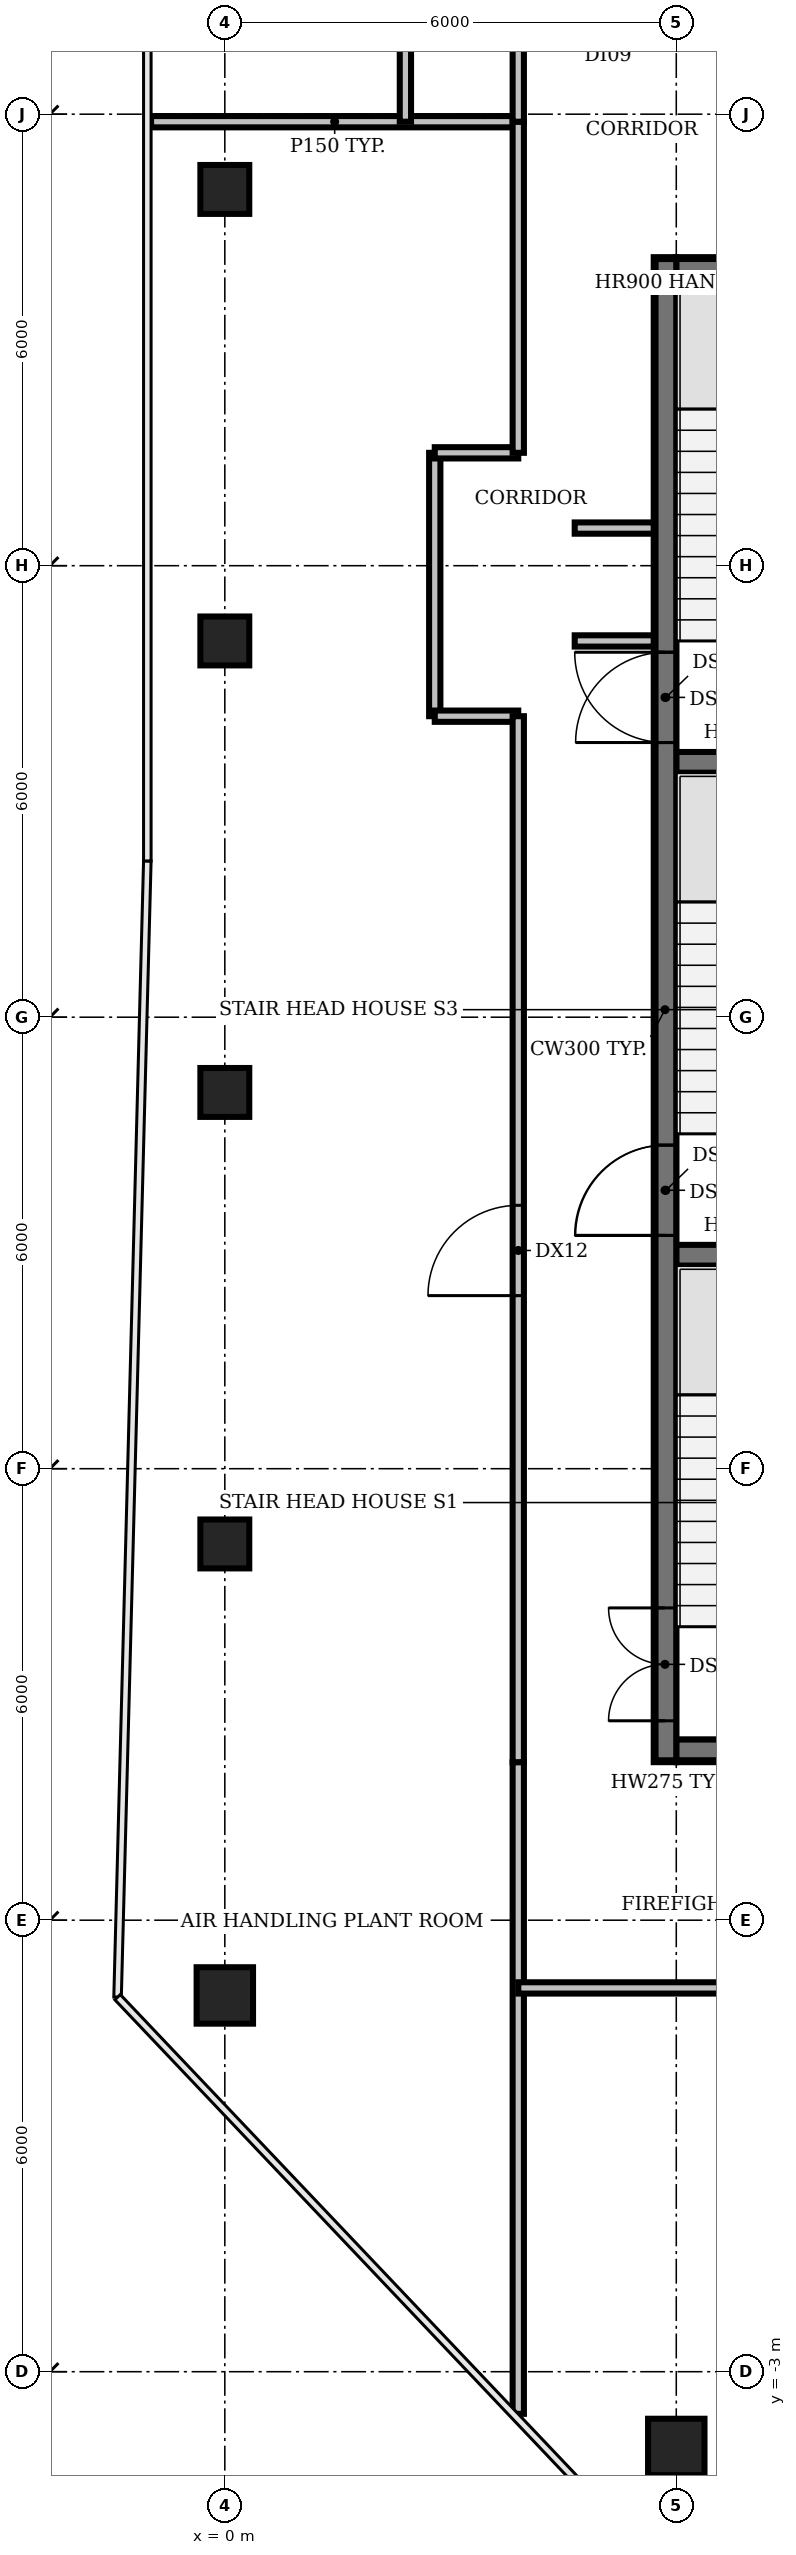
"""IFC4 building model, lengths in metres.
Left out: names, types, materials, properties, quantities, classifications, styles, units other than length and angle.
Written with IfcOpenShell. Run it as: python <this file> out.ifc"""

import sys

from ifc_helpers import new_model, si_unit, direction, frame, frame_2d, origin, origin_2d, place, context, subcontext, project, spatial, rectangle, circle, extrude, element, fill, save


model = new_model("IFC4")
c1 = context("Model", 3, precision=1e-05, world=origin(), true_north=direction((0.0, 1.0)))
c2 = subcontext(c1, "Body", "Model", "MODEL_VIEW")
j1 = project(units=[si_unit("LENGTHUNIT", "METRE"), si_unit("PLANEANGLEUNIT", "RADIAN")], contexts=[c1])
p1 = place(None, origin())
s1 = spatial("IfcSite", under=j1, at=p1, CompositionType="ELEMENT")
p2 = place(p1, origin())
s2 = spatial("IfcBuilding", under=s1, at=p2, CompositionType="ELEMENT")
p3 = place(p2, frame((0.0, 0.0, 339.8)))
s3 = spatial("IfcBuildingStorey", under=s2, at=p3, CompositionType="ELEMENT", Elevation=339.8)
p4 = place(p3, frame((0.0, 2.0, 0.0), z_axis=(0.0, 0.0, 1.0), x_axis=(1.0, 0.0, 0.0)))
e1 = element("IfcColumn", 1, at=p4, inside=s3, PredefinedType="COLUMN", context=c2, shape_type="SweptSolid", body=[
    extrude(circle(Radius=0.375, at=origin_2d()), origin(), (0.0, 0.0, 1.0), 3.9),
])
for number, where, z_axis, x_axis in (
    (2, (0.0, 8.0, 0.0), (0.0, 0.0, 1.0), (1.0, 0.0, 0.0)),
    (3, (0.0, 14.0, 0.0), (0.0, 0.0, 1.0), (1.0, 0.0, 0.0)),
    (4, (0.0, 20.0, 0.0), (0.0, 0.0, 1.0), (1.0, 0.0, 0.0)),
    (5, (0.0, 26.0, 0.0), (0.0, 0.0, 1.0), (1.0, 0.0, 0.0)),
):
    element("IfcColumn", number, at=place(p3, frame(where, z_axis=z_axis, x_axis=x_axis)), inside=s3, PredefinedType="COLUMN", context=c2, shape_type="SweptSolid", body=[
        extrude(rectangle(XDim=0.65, YDim=0.65, at=origin_2d()), origin(), (0.0, 0.0, 1.0), 3.9),
    ])
p5 = place(p3, frame((6.0, -4.0, 0.0), z_axis=(0.0, 0.0, 1.0), x_axis=(1.0, 0.0, 0.0)))
e6 = element("IfcColumn", 6, at=p5, inside=s3, PredefinedType="COLUMN", context=c2, shape_type="SweptSolid", body=[
    extrude(circle(Radius=0.375, at=origin_2d()), origin(), (0.0, 0.0, 1.0), 3.9),
])
for number, where, z_axis, x_axis in (
    (7, (6.0, 11.825, 0.0), (0.0, 0.0, 1.0), (1.0, 0.0, 0.0)),
    (8, (6.0, 18.375, 0.0), (0.0, 0.0, 1.0), (1.0, 0.0, 0.0)),
):
    element("IfcWall", number, at=place(p3, frame(where, z_axis=z_axis, x_axis=x_axis)), inside=s3, PredefinedType="SHEAR", context=c2, shape_type="SweptSolid", body=[
        extrude(rectangle(XDim=3.15, YDim=0.25, at=frame_2d((1.575, 0.0))), origin(), (0.0, 0.0, 1.0), 3.9),
    ])
p6 = place(p3, frame((5.85, 5.1, 0.0), z_axis=(0.0, 0.0, 1.0), x_axis=(0.0, 1.0, 0.0)))
e9 = element("IfcWall", 9, at=p6, inside=s3, PredefinedType="SHEAR", context=c2, shape_type="SweptSolid", body=[
    extrude(rectangle(XDim=20.0, YDim=0.3, at=frame_2d((10.0, 0.0))), origin(), (0.0, 0.0, 1.0), 3.9),
])
p7 = place(p6, frame((0.55, 0.0, 0.0)))
e10 = element("IfcOpeningElement", 10, at=p7, cuts=e9, PredefinedType="OPENING", context=c2, shape_type="SweptSolid", body=[
    extrude(rectangle(XDim=1.5, YDim=2.1, at=frame_2d((0.75, 1.05))), frame((0.0, 0.16, 0.0), z_axis=(0.0, -1.0, 0.0), x_axis=(1.0, 0.0, 0.0)), (0.0, 0.0, 1.0), 0.32),
])
p8 = place(p6, frame((7.0, 0.0, 0.0)))
e11 = element("IfcOpeningElement", 11, at=p8, cuts=e9, PredefinedType="OPENING", context=c2, shape_type="SweptSolid", body=[
    extrude(rectangle(XDim=1.2, YDim=2.1, at=frame_2d((0.6, 1.05))), frame((0.0, 0.16, 0.0), z_axis=(0.0, -1.0, 0.0), x_axis=(1.0, 0.0, 0.0)), (0.0, 0.0, 1.0), 0.32),
])
p9 = place(p6, frame((13.55, 0.0, 0.0)))
e12 = element("IfcOpeningElement", 12, at=p9, cuts=e9, PredefinedType="OPENING", context=c2, shape_type="SweptSolid", body=[
    extrude(rectangle(XDim=1.2, YDim=2.1, at=frame_2d((0.6, 1.05))), frame((0.0, 0.16, 0.0), z_axis=(0.0, -1.0, 0.0), x_axis=(1.0, 0.0, 0.0)), (0.0, 0.0, 1.0), 0.32),
])
p10 = place(p3, frame((24.0, 5.25, 0.0), z_axis=(0.0, 0.0, 1.0), x_axis=(-1.0, 0.0, 0.0)))
e13 = element("IfcWall", 13, at=p10, inside=s3, PredefinedType="SHEAR", context=c2, shape_type="SweptSolid", body=[
    extrude(rectangle(XDim=18.0, YDim=0.3, at=frame_2d((9.0, 0.0))), origin(), (0.0, 0.0, 1.0), 3.9),
])
p11 = place(p10, frame((13.0, 0.0, 0.0)))
e14 = element("IfcOpeningElement", 14, at=p11, cuts=e13, PredefinedType="OPENING", context=c2, shape_type="SweptSolid", body=[
    extrude(rectangle(XDim=1.2, YDim=2.1, at=frame_2d((0.6, 1.05))), frame((0.0, 0.16, 0.0), z_axis=(0.0, -1.0, 0.0), x_axis=(1.0, 0.0, 0.0)), (0.0, 0.0, 1.0), 0.32),
])
p12 = place(p10, frame((4.9, 0.0, 0.0)))
e15 = element("IfcOpeningElement", 15, at=p12, cuts=e13, PredefinedType="OPENING", context=c2, shape_type="SweptSolid", body=[
    extrude(rectangle(XDim=1.0, YDim=2.1, at=frame_2d((0.5, 1.05))), frame((0.0, 0.16, 0.0), z_axis=(0.0, -1.0, 0.0), x_axis=(1.0, 0.0, 0.0)), (0.0, 0.0, 1.0), 0.32),
])
p13 = place(p3, frame((6.0, 24.95, 0.0), z_axis=(0.0, 0.0, 1.0), x_axis=(1.0, 0.0, 0.0)))
e16 = element("IfcWall", 16, at=p13, inside=s3, PredefinedType="SHEAR", context=c2, shape_type="SweptSolid", body=[
    extrude(rectangle(XDim=18.0, YDim=0.3, at=frame_2d((9.0, 0.0))), origin(), (0.0, 0.0, 1.0), 3.9),
])
p14 = place(p3, frame((9.15, 5.263, 4.2), z_axis=(0.0, 0.0, 1.0), x_axis=(-1.0, 0.0, 0.0)))
e17 = element("IfcWall", 17, at=p14, inside=s3, PredefinedType="SHEAR", context=c2, shape_type="SweptSolid", body=[
    extrude(rectangle(XDim=3.15, YDim=0.275, at=frame_2d((1.575, 0.0))), origin(), (0.0, 0.0, 1.0), 3.0),
])
p15 = place(p14, frame((0.975, 0.0, 0.0)))
e18 = element("IfcOpeningElement", 18, at=p15, cuts=e17, PredefinedType="OPENING", context=c2, shape_type="SweptSolid", body=[
    extrude(rectangle(XDim=1.2, YDim=2.1, at=frame_2d((0.6, 1.05))), frame((0.0, 0.147, 0.0), z_axis=(0.0, -1.0, 0.0), x_axis=(1.0, 0.0, 0.0)), (0.0, 0.0, 1.0), 0.295),
])
for number, where, z_axis, x_axis in (
    (19, (6.0, 11.837, 4.2), (0.0, 0.0, 1.0), (1.0, 0.0, 0.0)),
    (20, (6.0, 18.387, 4.2), (0.0, 0.0, 1.0), (1.0, 0.0, 0.0)),
    (21, (6.0, 24.938, 4.2), (0.0, 0.0, 1.0), (1.0, 0.0, 0.0)),
):
    element("IfcWall", number, at=place(p3, frame(where, z_axis=z_axis, x_axis=x_axis)), inside=s3, PredefinedType="SHEAR", context=c2, shape_type="SweptSolid", body=[
        extrude(rectangle(XDim=3.15, YDim=0.275, at=frame_2d((1.575, 0.0))), origin(), (0.0, 0.0, 1.0), 3.0),
    ])
p16 = place(p3, frame((5.862, 5.125, 4.2), z_axis=(0.0, 0.0, 1.0), x_axis=(0.0, 1.0, 0.0)))
e22 = element("IfcWall", 22, at=p16, inside=s3, PredefinedType="SHEAR", context=c2, shape_type="SweptSolid", body=[
    extrude(rectangle(XDim=19.95, YDim=0.275, at=frame_2d((9.975, 0.0))), origin(), (0.0, 0.0, 1.0), 3.0),
])
p17 = place(p16, frame((6.975, 0.0, 0.0)))
e23 = element("IfcOpeningElement", 23, at=p17, cuts=e22, PredefinedType="OPENING", context=c2, shape_type="SweptSolid", body=[
    extrude(rectangle(XDim=1.2, YDim=2.1, at=frame_2d((0.6, 1.05))), frame((0.0, 0.147, 0.0), z_axis=(0.0, -1.0, 0.0), x_axis=(1.0, 0.0, 0.0)), (0.0, 0.0, 1.0), 0.295),
])
p18 = place(p16, frame((13.525, 0.0, 0.0)))
e24 = element("IfcOpeningElement", 24, at=p18, cuts=e22, PredefinedType="OPENING", context=c2, shape_type="SweptSolid", body=[
    extrude(rectangle(XDim=1.2, YDim=2.1, at=frame_2d((0.6, 1.05))), frame((0.0, 0.147, 0.0), z_axis=(0.0, -1.0, 0.0), x_axis=(1.0, 0.0, 0.0)), (0.0, 0.0, 1.0), 0.295),
])
p19 = place(p3, frame((-0.98, 26.9, 0.0), z_axis=(0.0, 0.0, 1.0), x_axis=(1.0, 0.0, 0.0)))
e25 = element("IfcWall", 25, at=p19, inside=s3, PredefinedType="PARTITIONING", context=c2, shape_type="SweptSolid", body=[
    extrude(rectangle(XDim=4.88, YDim=0.15, at=frame_2d((2.44, 0.0))), origin(), (0.0, 0.0, 1.0), 2.95),
])
p20 = place(p3, frame((2.4, 26.9, 0.0), z_axis=(0.0, 0.0, 1.0), x_axis=(0.0, 1.0, 0.0)))
e26 = element("IfcWall", 26, at=p20, inside=s3, PredefinedType="PARTITIONING", context=c2, shape_type="SweptSolid", body=[
    extrude(rectangle(XDim=6.0, YDim=0.15, at=frame_2d((3.0, 0.0))), origin(), (0.0, 0.0, 1.0), 2.95),
])
p21 = place(p3, frame((2.79, 19.0, 0.0), z_axis=(0.0, 0.0, 1.0), x_axis=(0.0, 1.0, 0.0)))
e27 = element("IfcWall", 27, at=p21, inside=s3, PredefinedType="PARTITIONING", context=c2, shape_type="SweptSolid", body=[
    extrude(rectangle(XDim=3.5, YDim=0.15, at=frame_2d((1.75, 0.0))), origin(), (0.0, 0.0, 1.0), 2.95),
])
for number, where, z_axis, x_axis in (
    (28, (2.79, 19.0, 0.0), (0.0, 0.0, 1.0), (1.0, 0.0, 0.0)),
    (29, (2.79, 22.5, 0.0), (0.0, 0.0, 1.0), (1.0, 0.0, 0.0)),
):
    element("IfcWall", number, at=place(p3, frame(where, z_axis=z_axis, x_axis=x_axis)), inside=s3, PredefinedType="PARTITIONING", context=c2, shape_type="SweptSolid", body=[
        extrude(rectangle(XDim=1.11, YDim=0.15, at=frame_2d((0.555, 0.0))), origin(), (0.0, 0.0, 1.0), 2.95),
    ])
p22 = place(p3, frame((3.9, -3.56, 0.0), z_axis=(0.0, 0.0, 1.0), x_axis=(0.0, 1.0, 0.0)))
e30 = element("IfcWall", 30, at=p22, inside=s3, PredefinedType="PARTITIONING", context=c2, shape_type="SweptSolid", body=[
    extrude(rectangle(XDim=8.66, YDim=0.15, at=frame_2d((4.33, 0.0))), origin(), (0.0, 0.0, 1.0), 2.95),
])
p23 = place(p3, frame((3.9, 5.1, 0.0), z_axis=(0.0, 0.0, 1.0), x_axis=(0.0, 1.0, 0.0)))
e31 = element("IfcWall", 31, at=p23, inside=s3, PredefinedType="PARTITIONING", context=c2, shape_type="SweptSolid", body=[
    extrude(rectangle(XDim=13.9, YDim=0.15, at=frame_2d((6.95, 0.0))), origin(), (0.0, 0.0, 1.0), 2.95),
])
p24 = place(p23, frame((6.2, 0.0, 0.0)))
e32 = element("IfcOpeningElement", 32, at=p24, cuts=e31, PredefinedType="OPENING", context=c2, shape_type="SweptSolid", body=[
    extrude(rectangle(XDim=1.2, YDim=2.1, at=frame_2d((0.6, 1.05))), frame((0.0, 0.085, 0.0), z_axis=(0.0, -1.0, 0.0), x_axis=(1.0, 0.0, 0.0)), (0.0, 0.0, 1.0), 0.17),
])
p25 = place(p3, frame((3.9, 22.5, 0.0), z_axis=(0.0, 0.0, 1.0), x_axis=(0.0, 1.0, 0.0)))
e33 = element("IfcWall", 33, at=p25, inside=s3, PredefinedType="PARTITIONING", context=c2, shape_type="SweptSolid", body=[
    extrude(rectangle(XDim=4.4, YDim=0.15, at=frame_2d((2.2, 0.0))), origin(), (0.0, 0.0, 1.0), 2.95),
])
p26 = place(p3, frame((3.9, 26.9, 0.0), z_axis=(0.0, 0.0, 1.0), x_axis=(0.0, 1.0, 0.0)))
e34 = element("IfcWall", 34, at=p26, inside=s3, PredefinedType="PARTITIONING", context=c2, shape_type="SweptSolid", body=[
    extrude(rectangle(XDim=1.2, YDim=0.15, at=frame_2d((0.6, 0.0))), origin(), (0.0, 0.0, 1.0), 2.95),
])
for number, where, z_axis, x_axis in (
    (35, (4.65, 20.0, 0.0), (0.0, 0.0, 1.0), (1.0, 0.0, 0.0)),
    (36, (4.65, 21.5, 0.0), (0.0, 0.0, 1.0), (1.0, 0.0, 0.0)),
):
    element("IfcWall", number, at=place(p3, frame(where, z_axis=z_axis, x_axis=x_axis)), inside=s3, PredefinedType="PARTITIONING", context=c2, shape_type="SweptSolid", body=[
        extrude(rectangle(XDim=1.05, YDim=0.15, at=frame_2d((0.525, 0.0))), origin(), (0.0, 0.0, 1.0), 2.95),
    ])
p27 = place(p3, frame((26.1, 2.1, 0.0), z_axis=(0.0, 0.0, 1.0), x_axis=(-1.0, 0.0, 0.0)))
e37 = element("IfcWall", 37, at=p27, inside=s3, PredefinedType="PARTITIONING", context=c2, shape_type="SweptSolid", body=[
    extrude(rectangle(XDim=22.2, YDim=0.15, at=frame_2d((11.1, 0.0))), origin(), (0.0, 0.0, 1.0), 2.95),
])
p28 = place(p27, frame((10.6, 0.0, 0.0)))
e38 = element("IfcOpeningElement", 38, at=p28, cuts=e37, PredefinedType="OPENING", context=c2, shape_type="SweptSolid", body=[
    extrude(rectangle(XDim=1.2, YDim=2.1, at=frame_2d((0.6, 1.05))), frame((0.0, 0.085, 0.0), z_axis=(0.0, -1.0, 0.0), x_axis=(1.0, 0.0, 0.0)), (0.0, 0.0, 1.0), 0.17),
])
p29 = place(p7, origin())
e39 = element("IfcDoor", 39, at=p29, inside=s3, OperationType="DOUBLE_DOOR_SINGLE_SWING", PredefinedType="DOOR", context=c2, shape_type="SweptSolid", body=[
    extrude(rectangle(XDim=1.5, YDim=2.1, at=frame_2d((0.75, 1.05))), frame((0.0, 0.025, 0.0), z_axis=(0.0, -1.0, 0.0), x_axis=(1.0, 0.0, 0.0)), (0.0, 0.0, 1.0), 0.05),
])
fill(e10, e39)
p30 = place(p8, origin())
e40 = element("IfcDoor", 40, at=p30, inside=s3, OperationType="SINGLE_SWING_LEFT", PredefinedType="DOOR", context=c2, shape_type="SweptSolid", body=[
    extrude(rectangle(XDim=1.2, YDim=2.1, at=frame_2d((0.6, 1.05))), frame((0.0, 0.025, 0.0), z_axis=(0.0, -1.0, 0.0), x_axis=(1.0, 0.0, 0.0)), (0.0, 0.0, 1.0), 0.05),
])
fill(e11, e40)
p31 = place(p9, origin())
e41 = element("IfcDoor", 41, at=p31, inside=s3, OperationType="SINGLE_SWING_RIGHT", PredefinedType="DOOR", context=c2, shape_type="SweptSolid", body=[
    extrude(rectangle(XDim=1.2, YDim=2.1, at=frame_2d((0.6, 1.05))), frame((0.0, 0.025, 0.0), z_axis=(0.0, -1.0, 0.0), x_axis=(1.0, 0.0, 0.0)), (0.0, 0.0, 1.0), 0.05),
])
fill(e12, e41)
p32 = place(p17, origin())
e42 = element("IfcDoor", 42, at=p32, inside=s3, OperationType="SINGLE_SWING_LEFT", PredefinedType="DOOR", context=c2, shape_type="SweptSolid", body=[
    extrude(rectangle(XDim=1.2, YDim=2.1, at=frame_2d((0.6, 1.05))), frame((0.0, 0.025, 0.0), z_axis=(0.0, -1.0, 0.0), x_axis=(1.0, 0.0, 0.0)), (0.0, 0.0, 1.0), 0.05),
])
fill(e23, e42)
p33 = place(p18, origin())
e43 = element("IfcDoor", 43, at=p33, inside=s3, OperationType="SINGLE_SWING_LEFT", PredefinedType="DOOR", context=c2, shape_type="SweptSolid", body=[
    extrude(rectangle(XDim=1.2, YDim=2.1, at=frame_2d((0.6, 1.05))), frame((0.0, 0.025, 0.0), z_axis=(0.0, -1.0, 0.0), x_axis=(1.0, 0.0, 0.0)), (0.0, 0.0, 1.0), 0.05),
])
fill(e24, e43)
p34 = place(p24, origin())
e44 = element("IfcDoor", 44, at=p34, inside=s3, OperationType="SINGLE_SWING_LEFT", PredefinedType="DOOR", context=c2, shape_type="SweptSolid", body=[
    extrude(rectangle(XDim=1.2, YDim=2.1, at=frame_2d((0.6, 1.05))), frame((0.0, 0.025, 0.0), z_axis=(0.0, -1.0, 0.0), x_axis=(1.0, 0.0, 0.0)), (0.0, 0.0, 1.0), 0.05),
])
fill(e32, e44)
save(model, sys.argv[1])
